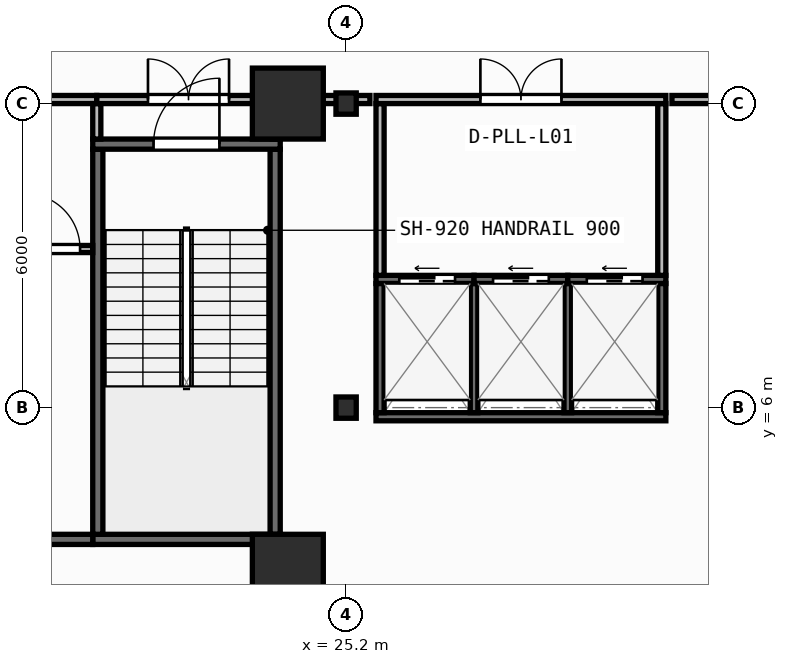
"""IFC4 building model, lengths in metres.
Left out: names, types, materials, properties, quantities, classifications, styles, units other than length and angle.
Written with IfcOpenShell. Run it as: python <this file> out.ifc"""

import sys

from ifc_helpers import new_model, si_unit, direction, frame, frame_2d, origin, origin_2d, place, context, subcontext, project, spatial, rectangle, i_section, extrude, element, fill, save


model = new_model("IFC4")
c1 = context("Model", 3, precision=1e-05, world=origin(), true_north=direction((0.0, 1.0)))
c2 = subcontext(c1, "Body", "Model", "MODEL_VIEW")
j1 = project(units=[si_unit("LENGTHUNIT", "METRE"), si_unit("PLANEANGLEUNIT", "RADIAN")], contexts=[c1])
p1 = place(None, origin())
s1 = spatial("IfcSite", under=j1, at=p1, CompositionType="ELEMENT")
p2 = place(p1, origin())
s2 = spatial("IfcBuilding", under=s1, at=p2, CompositionType="ELEMENT")
p3 = place(p2, frame((0.0, 0.0, 4.5)))
s3 = spatial("IfcBuildingStorey", under=s2, at=p3, CompositionType="ELEMENT", Elevation=4.5)
p4 = place(p3, frame((24.05, 2.8, 0.0), z_axis=(0.0, 0.0, 1.0), x_axis=(1.0, 0.0, 0.0)))
e1 = element("IfcColumn", 1, at=p4, inside=s3, PredefinedType="COLUMN", context=c2, shape_type="SweptSolid", body=[
    extrude(rectangle(XDim=1.4, YDim=1.4, at=origin_2d()), origin(), (0.0, 0.0, 1.0), 4.5),
])
p5 = place(p3, frame((25.2, 6.0, 0.0), z_axis=(0.0, 0.0, 1.0), x_axis=(1.0, 0.0, 0.0)))
e2 = element("IfcColumn", 2, at=p5, inside=s3, PredefinedType="COLUMN", context=c2, shape_type="SweptSolid", body=[
    extrude(i_section(OverallWidth=0.4, OverallDepth=0.42, WebThickness=0.025, FlangeThickness=0.04, at=origin_2d()), origin(), (0.0, 0.0, 1.0), 4.5),
])
p6 = place(p3, frame((24.05, 12.0, 0.0), z_axis=(0.0, 0.0, 1.0), x_axis=(1.0, 0.0, 0.0)))
e3 = element("IfcColumn", 3, at=p6, inside=s3, PredefinedType="COLUMN", context=c2, shape_type="SweptSolid", body=[
    extrude(rectangle(XDim=1.4, YDim=1.4, at=origin_2d()), origin(), (0.0, 0.0, 1.0), 4.5),
])
p7 = place(p3, frame((25.2, 12.0, 0.0), z_axis=(0.0, 0.0, 1.0), x_axis=(1.0, 0.0, 0.0)))
e4 = element("IfcColumn", 4, at=p7, inside=s3, PredefinedType="COLUMN", context=c2, shape_type="SweptSolid", body=[
    extrude(i_section(OverallWidth=0.4, OverallDepth=0.42, WebThickness=0.025, FlangeThickness=0.04, at=origin_2d()), origin(), (0.0, 0.0, 1.0), 4.5),
])
p8 = place(p3, frame((20.2, 3.4, 0.0), z_axis=(0.0, 0.0, 1.0), x_axis=(1.0, 0.0, 0.0)))
e5 = element("IfcWall", 5, at=p8, inside=s3, PredefinedType="SHEAR", context=c2, shape_type="SweptSolid", body=[
    extrude(rectangle(XDim=3.7, YDim=0.2, at=frame_2d((1.85, 0.0))), origin(), (0.0, 0.0, 1.0), 4.25),
])
for number, where, z_axis, x_axis in (
    (6, (20.3, 3.5, 0.0), (0.0, 0.0, 1.0), (0.0, 1.0, 0.0)),
    (7, (23.8, 3.5, 0.0), (0.0, 0.0, 1.0), (0.0, 1.0, 0.0)),
):
    element("IfcWall", number, at=place(p3, frame(where, z_axis=z_axis, x_axis=x_axis)), inside=s3, PredefinedType="SHEAR", context=c2, shape_type="SweptSolid", body=[
        extrude(rectangle(XDim=7.6, YDim=0.2, at=frame_2d((3.8, 0.0))), origin(), (0.0, 0.0, 1.0), 4.25),
    ])
p9 = place(p3, frame((20.2, 11.2, 0.0), z_axis=(0.0, 0.0, 1.0), x_axis=(1.0, 0.0, 0.0)))
e8 = element("IfcWall", 8, at=p9, inside=s3, PredefinedType="SHEAR", context=c2, shape_type="SweptSolid", body=[
    extrude(rectangle(XDim=3.7, YDim=0.2, at=frame_2d((1.85, 0.0))), origin(), (0.0, 0.0, 1.0), 4.25),
])
p10 = place(p9, frame((1.2, 0.0, 0.0)))
e9 = element("IfcOpeningElement", 9, at=p10, cuts=e8, PredefinedType="OPENING", context=c2, shape_type="SweptSolid", body=[
    extrude(rectangle(XDim=1.3, YDim=2.15, at=frame_2d((0.65, 1.075))), frame((0.0, 0.11, 0.0), z_axis=(0.0, -1.0, 0.0), x_axis=(1.0, 0.0, 0.0)), (0.0, 0.0, 1.0), 0.22),
])
p11 = place(p3, frame((6.5, 3.4, 0.0), z_axis=(0.0, 0.0, 1.0), x_axis=(1.0, 0.0, 0.0)))
e10 = element("IfcWall", 10, at=p11, inside=s3, PredefinedType="SHEAR", context=c2, shape_type="SweptSolid", body=[
    extrude(rectangle(XDim=13.7, YDim=0.2, at=frame_2d((6.85, 0.0))), origin(), (0.0, 0.0, 1.0), 4.25),
])
p12 = place(p3, frame((25.79, 5.82, 0.0), z_axis=(0.0, 0.0, 1.0), x_axis=(1.0, 0.0, 0.0)))
e11 = element("IfcWall", 11, at=p12, inside=s3, PredefinedType="SHEAR", context=c2, shape_type="SweptSolid", body=[
    extrude(rectangle(XDim=5.72, YDim=0.16, at=frame_2d((2.86, 0.0))), origin(), (0.0, 0.0, 1.0), 4.25),
])
for number, where, z_axis, x_axis in (
    (12, (25.87, 5.9, 0.0), (0.0, 0.0, 1.0), (0.0, 1.0, 0.0)),
    (13, (31.43, 5.9, 0.0), (0.0, 0.0, 1.0), (0.0, 1.0, 0.0)),
):
    element("IfcWall", number, at=place(p3, frame(where, z_axis=z_axis, x_axis=x_axis)), inside=s3, PredefinedType="SHEAR", context=c2, shape_type="SweptSolid", body=[
        extrude(rectangle(XDim=2.55, YDim=0.16, at=frame_2d((1.275, 0.0))), origin(), (0.0, 0.0, 1.0), 4.25),
    ])
for number, where, z_axis, x_axis in (
    (14, (27.725, 5.9, 0.0), (0.0, 0.0, 1.0), (0.0, 1.0, 0.0)),
    (15, (29.575, 5.9, 0.0), (0.0, 0.0, 1.0), (0.0, 1.0, 0.0)),
):
    element("IfcWall", number, at=place(p3, frame(where, z_axis=z_axis, x_axis=x_axis)), inside=s3, PredefinedType="SHEAR", context=c2, shape_type="SweptSolid", body=[
        extrude(rectangle(XDim=2.55, YDim=0.15, at=frame_2d((1.275, 0.0))), origin(), (0.0, 0.0, 1.0), 4.25),
    ])
p13 = place(p3, frame((25.79, 8.53, 0.0), z_axis=(0.0, 0.0, 1.0), x_axis=(1.0, 0.0, 0.0)))
e16 = element("IfcWall", 16, at=p13, inside=s3, PredefinedType="SHEAR", context=c2, shape_type="SweptSolid", body=[
    extrude(rectangle(XDim=1.935, YDim=0.16, at=frame_2d((0.968, 0.0))), origin(), (0.0, 0.0, 1.0), 4.25),
])
p14 = place(p13, frame((0.46, 0.0, 0.0)))
e17 = element("IfcOpeningElement", 17, at=p14, cuts=e16, PredefinedType="OPENING", context=c2, shape_type="SweptSolid", body=[
    extrude(rectangle(XDim=1.1, YDim=2.15, at=frame_2d((0.55, 1.075))), frame((0.0, 0.09, 0.0), z_axis=(0.0, -1.0, 0.0), x_axis=(1.0, 0.0, 0.0)), (0.0, 0.0, 1.0), 0.18),
])
p15 = place(p3, frame((27.725, 8.53, 0.0), z_axis=(0.0, 0.0, 1.0), x_axis=(1.0, 0.0, 0.0)))
e18 = element("IfcWall", 18, at=p15, inside=s3, PredefinedType="SHEAR", context=c2, shape_type="SweptSolid", body=[
    extrude(rectangle(XDim=1.85, YDim=0.16, at=frame_2d((0.925, 0.0))), origin(), (0.0, 0.0, 1.0), 4.25),
])
p16 = place(p15, frame((0.375, 0.0, 0.0)))
e19 = element("IfcOpeningElement", 19, at=p16, cuts=e18, PredefinedType="OPENING", context=c2, shape_type="SweptSolid", body=[
    extrude(rectangle(XDim=1.1, YDim=2.15, at=frame_2d((0.55, 1.075))), frame((0.0, 0.09, 0.0), z_axis=(0.0, -1.0, 0.0), x_axis=(1.0, 0.0, 0.0)), (0.0, 0.0, 1.0), 0.18),
])
p17 = place(p3, frame((29.575, 8.53, 0.0), z_axis=(0.0, 0.0, 1.0), x_axis=(1.0, 0.0, 0.0)))
e20 = element("IfcWall", 20, at=p17, inside=s3, PredefinedType="SHEAR", context=c2, shape_type="SweptSolid", body=[
    extrude(rectangle(XDim=1.935, YDim=0.16, at=frame_2d((0.968, 0.0))), origin(), (0.0, 0.0, 1.0), 4.25),
])
p18 = place(p17, frame((0.375, 0.0, 0.0)))
e21 = element("IfcOpeningElement", 21, at=p18, cuts=e20, PredefinedType="OPENING", context=c2, shape_type="SweptSolid", body=[
    extrude(rectangle(XDim=1.1, YDim=2.15, at=frame_2d((0.55, 1.075))), frame((0.0, 0.09, 0.0), z_axis=(0.0, -1.0, 0.0), x_axis=(1.0, 0.0, 0.0)), (0.0, 0.0, 1.0), 0.18),
])
p19 = place(p3, frame((18.61, 9.13, 0.0), z_axis=(0.0, 0.0, 1.0), x_axis=(1.0, 0.0, 0.0)))
e22 = element("IfcWall", 22, at=p19, inside=s3, PredefinedType="PARTITIONING", context=c2, shape_type="SweptSolid", body=[
    extrude(rectangle(XDim=1.59, YDim=0.14, at=frame_2d((0.795, 0.0))), origin(), (0.0, 0.0, 1.0), 4.25),
])
p20 = place(p19, frame((0.24, 0.0, 0.0)))
e23 = element("IfcOpeningElement", 23, at=p20, cuts=e22, PredefinedType="OPENING", context=c2, shape_type="SweptSolid", body=[
    extrude(rectangle(XDim=1.1, YDim=2.1, at=frame_2d((0.55, 1.05))), frame((0.0, 0.08, 0.0), z_axis=(0.0, -1.0, 0.0), x_axis=(1.0, 0.0, 0.0)), (0.0, 0.0, 1.0), 0.16),
])
p21 = place(p3, frame((12.58, 12.08, 0.0), z_axis=(0.0, 0.0, 1.0), x_axis=(1.0, 0.0, 0.0)))
e24 = element("IfcWall", 24, at=p21, inside=s3, PredefinedType="PARTITIONING", context=c2, shape_type="SweptSolid", body=[
    extrude(rectangle(XDim=7.7, YDim=0.16, at=frame_2d((3.85, 0.0))), origin(), (0.0, 0.0, 1.0), 3.425),
])
p22 = place(p21, frame((3.05, 0.0, 0.0)))
e25 = element("IfcOpeningElement", 25, at=p22, cuts=e24, PredefinedType="OPENING", context=c2, shape_type="SweptSolid", body=[
    extrude(rectangle(XDim=1.6, YDim=2.05, at=frame_2d((0.8, 1.025))), frame((0.0, 0.09, 0.0), z_axis=(0.0, -1.0, 0.0), x_axis=(1.0, 0.0, 0.0)), (0.0, 0.0, 1.0), 0.18),
])
p23 = place(p3, frame((20.28, 11.3, 0.0), z_axis=(0.0, 0.0, 1.0), x_axis=(0.0, 1.0, 0.0)))
e26 = element("IfcWall", 26, at=p23, inside=s3, PredefinedType="PARTITIONING", context=c2, shape_type="SweptSolid", body=[
    extrude(rectangle(XDim=0.7, YDim=0.16, at=frame_2d((0.35, 0.0))), origin(), (0.0, 0.0, 1.0), 4.25),
])
p24 = place(p3, frame((20.28, 12.08, 0.0), z_axis=(0.0, 0.0, 1.0), x_axis=(1.0, 0.0, 0.0)))
e27 = element("IfcWall", 27, at=p24, inside=s3, PredefinedType="PARTITIONING", context=c2, shape_type="SweptSolid", body=[
    extrude(rectangle(XDim=3.62, YDim=0.16, at=frame_2d((1.81, 0.0))), origin(), (0.0, 0.0, 1.0), 3.425),
])
p25 = place(p24, frame((1.01, 0.0, 0.0)))
e28 = element("IfcOpeningElement", 28, at=p25, cuts=e27, PredefinedType="OPENING", context=c2, shape_type="SweptSolid", body=[
    extrude(rectangle(XDim=1.6, YDim=2.05, at=frame_2d((0.8, 1.025))), frame((0.0, 0.09, 0.0), z_axis=(0.0, -1.0, 0.0), x_axis=(1.0, 0.0, 0.0)), (0.0, 0.0, 1.0), 0.18),
])
p26 = place(p3, frame((23.82, 11.3, 0.0), z_axis=(0.0, 0.0, 1.0), x_axis=(0.0, 1.0, 0.0)))
e29 = element("IfcWall", 29, at=p26, inside=s3, PredefinedType="PARTITIONING", context=c2, shape_type="SweptSolid", body=[
    extrude(rectangle(XDim=0.7, YDim=0.16, at=frame_2d((0.35, 0.0))), origin(), (0.0, 0.0, 1.0), 4.25),
])
for number, where, z_axis, x_axis in (
    (30, (25.87, 8.61, 0.0), (0.0, 0.0, 1.0), (0.0, 1.0, 0.0)),
    (31, (31.43, 8.61, 0.0), (0.0, 0.0, 1.0), (0.0, 1.0, 0.0)),
):
    element("IfcWall", number, at=place(p3, frame(where, z_axis=z_axis, x_axis=x_axis)), inside=s3, PredefinedType="PARTITIONING", context=c2, shape_type="SweptSolid", body=[
        extrude(rectangle(XDim=3.39, YDim=0.16, at=frame_2d((1.695, 0.0))), origin(), (0.0, 0.0, 1.0), 4.25),
    ])
p27 = place(p3, frame((25.79, 12.08, 0.0), z_axis=(0.0, 0.0, 1.0), x_axis=(1.0, 0.0, 0.0)))
e32 = element("IfcWall", 32, at=p27, inside=s3, PredefinedType="PARTITIONING", context=c2, shape_type="SweptSolid", body=[
    extrude(rectangle(XDim=5.72, YDim=0.16, at=frame_2d((2.86, 0.0))), origin(), (0.0, 0.0, 1.0), 3.425),
])
p28 = place(p27, frame((2.06, 0.0, 0.0)))
e33 = element("IfcOpeningElement", 33, at=p28, cuts=e32, PredefinedType="OPENING", context=c2, shape_type="SweptSolid", body=[
    extrude(rectangle(XDim=1.6, YDim=2.05, at=frame_2d((0.8, 1.025))), frame((0.0, 0.09, 0.0), z_axis=(0.0, -1.0, 0.0), x_axis=(1.0, 0.0, 0.0)), (0.0, 0.0, 1.0), 0.18),
])
p29 = place(p3, frame((24.02, 12.08, 0.0), z_axis=(0.0, 0.0, 1.0), x_axis=(1.0, 0.0, 0.0)))
e34 = element("IfcWall", 34, at=p29, inside=s3, PredefinedType="PARTITIONING", context=c2, shape_type="SweptSolid", body=[
    extrude(rectangle(XDim=1.65, YDim=0.16, at=frame_2d((0.825, 0.0))), origin(), (0.0, 0.0, 1.0), 3.425),
])
p30 = place(p3, frame((31.63, 12.08, 0.0), z_axis=(0.0, 0.0, 1.0), x_axis=(1.0, 0.0, 0.0)))
e35 = element("IfcWall", 35, at=p30, inside=s3, PredefinedType="PARTITIONING", context=c2, shape_type="SweptSolid", body=[
    extrude(rectangle(XDim=11.181, YDim=0.16, at=frame_2d((5.59, 0.0))), origin(), (0.0, 0.0, 1.0), 3.425),
])
p31 = place(p10, origin())
e36 = element("IfcDoor", 36, at=p31, inside=s3, OperationType="SINGLE_SWING_RIGHT", PredefinedType="DOOR", context=c2, shape_type="SweptSolid", body=[
    extrude(rectangle(XDim=1.3, YDim=2.15, at=frame_2d((0.65, 1.075))), frame((0.0, 0.025, 0.0), z_axis=(0.0, -1.0, 0.0), x_axis=(1.0, 0.0, 0.0)), (0.0, 0.0, 1.0), 0.05),
])
fill(e9, e36)
p32 = place(p14, origin())
e37 = element("IfcDoor", 37, at=p32, inside=s3, OperationType="SLIDING_TO_LEFT", PredefinedType="DOOR", context=c2, shape_type="SweptSolid", body=[
    extrude(rectangle(XDim=1.1, YDim=2.15, at=frame_2d((0.55, 1.075))), frame((0.0, 0.025, 0.0), z_axis=(0.0, -1.0, 0.0), x_axis=(1.0, 0.0, 0.0)), (0.0, 0.0, 1.0), 0.05),
])
fill(e17, e37)
p33 = place(p16, origin())
e38 = element("IfcDoor", 38, at=p33, inside=s3, OperationType="SLIDING_TO_LEFT", PredefinedType="DOOR", context=c2, shape_type="SweptSolid", body=[
    extrude(rectangle(XDim=1.1, YDim=2.15, at=frame_2d((0.55, 1.075))), frame((0.0, 0.025, 0.0), z_axis=(0.0, -1.0, 0.0), x_axis=(1.0, 0.0, 0.0)), (0.0, 0.0, 1.0), 0.05),
])
fill(e19, e38)
p34 = place(p18, origin())
e39 = element("IfcDoor", 39, at=p34, inside=s3, OperationType="SLIDING_TO_LEFT", PredefinedType="DOOR", context=c2, shape_type="SweptSolid", body=[
    extrude(rectangle(XDim=1.1, YDim=2.15, at=frame_2d((0.55, 1.075))), frame((0.0, 0.025, 0.0), z_axis=(0.0, -1.0, 0.0), x_axis=(1.0, 0.0, 0.0)), (0.0, 0.0, 1.0), 0.05),
])
fill(e21, e39)
p35 = place(p20, origin())
e40 = element("IfcDoor", 40, at=p35, inside=s3, OperationType="SINGLE_SWING_LEFT", PredefinedType="DOOR", context=c2, shape_type="SweptSolid", body=[
    extrude(rectangle(XDim=1.1, YDim=2.1, at=frame_2d((0.55, 1.05))), frame((0.0, 0.025, 0.0), z_axis=(0.0, -1.0, 0.0), x_axis=(1.0, 0.0, 0.0)), (0.0, 0.0, 1.0), 0.05),
])
fill(e23, e40)
p36 = place(p25, origin())
e41 = element("IfcDoor", 41, at=p36, inside=s3, OperationType="DOUBLE_DOOR_SINGLE_SWING", PredefinedType="DOOR", context=c2, shape_type="SweptSolid", body=[
    extrude(rectangle(XDim=1.6, YDim=2.05, at=frame_2d((0.8, 1.025))), frame((0.0, 0.025, 0.0), z_axis=(0.0, -1.0, 0.0), x_axis=(1.0, 0.0, 0.0)), (0.0, 0.0, 1.0), 0.05),
])
fill(e28, e41)
p37 = place(p28, origin())
e42 = element("IfcDoor", 42, at=p37, inside=s3, OperationType="DOUBLE_DOOR_SINGLE_SWING", PredefinedType="DOOR", context=c2, shape_type="SweptSolid", body=[
    extrude(rectangle(XDim=1.6, YDim=2.05, at=frame_2d((0.8, 1.025))), frame((0.0, 0.025, 0.0), z_axis=(0.0, -1.0, 0.0), x_axis=(1.0, 0.0, 0.0)), (0.0, 0.0, 1.0), 0.05),
])
fill(e33, e42)
save(model, sys.argv[1])
